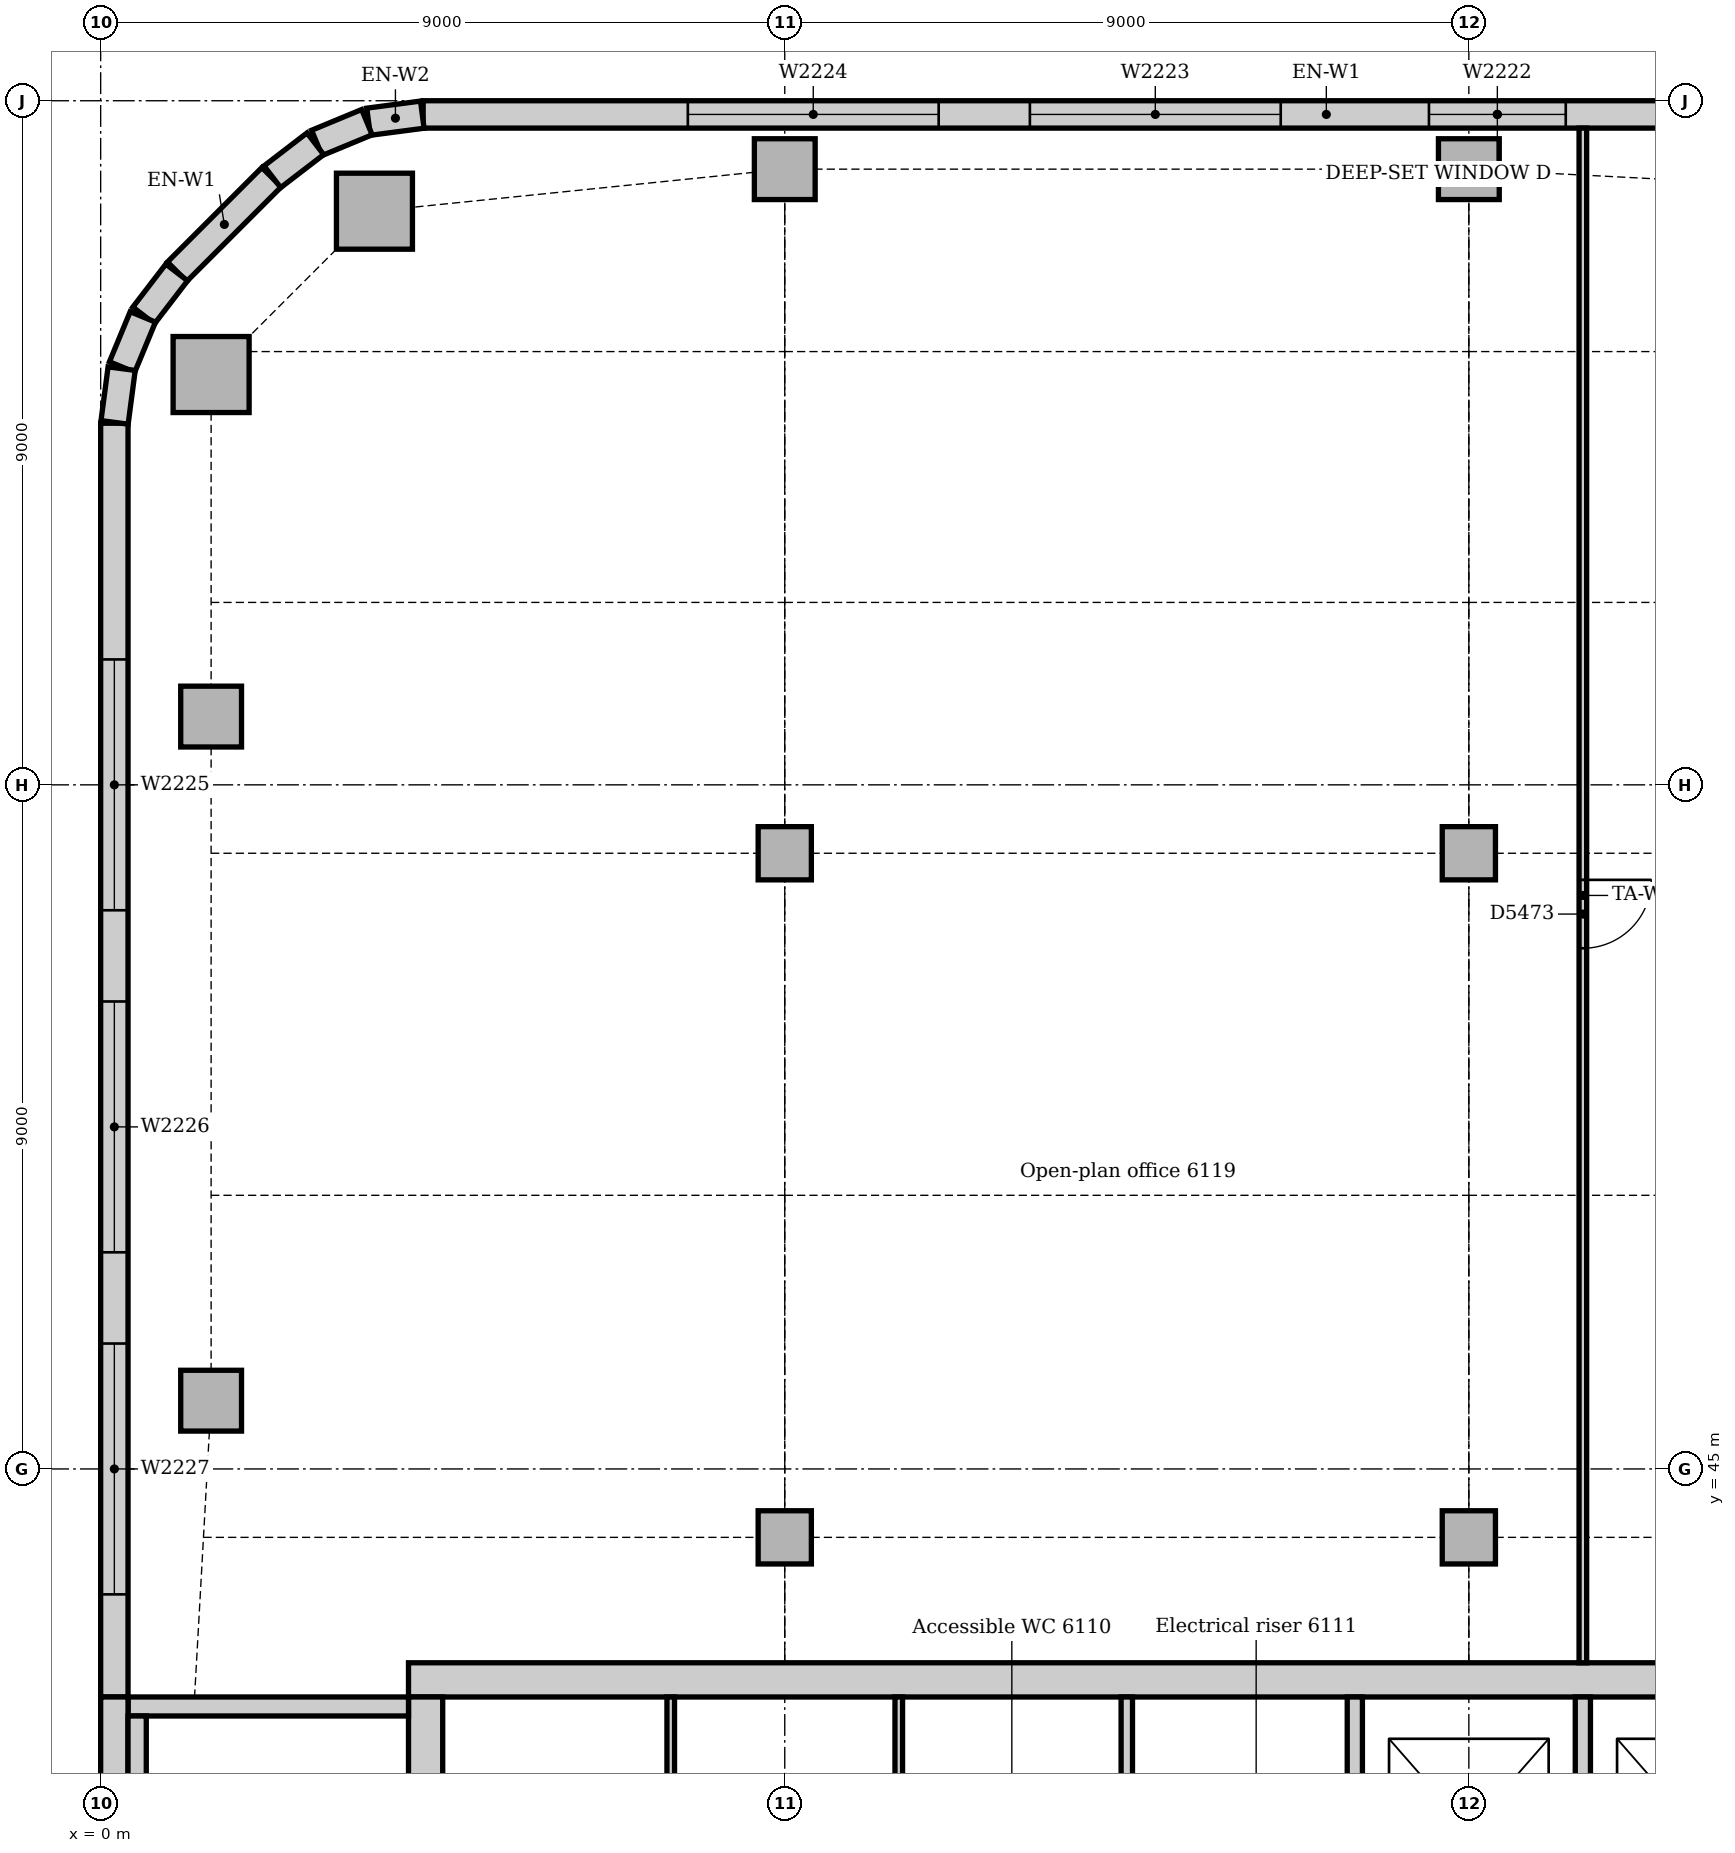
"""IFC4 building model, lengths in metres.
Left out: names, types, materials, properties, quantities, classifications, styles, units other than length and angle.
Written with IfcOpenShell. Run it as: python <this file> out.ifc"""

import sys

from ifc_helpers import new_model, si_unit, direction, frame, frame_2d, origin, origin_2d, place, context, subcontext, project, spatial, rectangle, extrude, element, fill, save


model = new_model("IFC4")
c1 = context("Model", 3, precision=1e-05, world=origin(), true_north=direction((0.0, 1.0)))
c2 = subcontext(c1, "Body", "Model", "MODEL_VIEW")
j1 = project(units=[si_unit("LENGTHUNIT", "METRE"), si_unit("PLANEANGLEUNIT", "RADIAN")], contexts=[c1])
p1 = place(None, origin())
s1 = spatial("IfcSite", under=j1, at=p1, CompositionType="ELEMENT")
p2 = place(p1, origin())
s2 = spatial("IfcBuilding", under=s1, at=p2, CompositionType="ELEMENT")
p3 = place(p2, frame((0.0, 0.0, 255.0)))
s3 = spatial("IfcBuildingStorey", under=s2, at=p3, CompositionType="ELEMENT", Elevation=255.0)
p4 = place(p3, frame((22.95, 42.225, 0.0), z_axis=(0.0, 0.0, 1.0), x_axis=(-1.0, 0.0, 0.0)))
e1 = element("IfcWall", 1, at=p4, inside=s3, PredefinedType="SOLIDWALL", context=c2, shape_type="SweptSolid", body=[
    extrude(rectangle(XDim=18.9, YDim=0.45, at=frame_2d((9.45, 0.0))), origin(), (0.0, 0.0, 1.0), 4.0),
])
p5 = place(p3, frame((4.275, 42.0, 0.0), z_axis=(0.0, 0.0, 1.0), x_axis=(0.0, -1.0, 0.0)))
e2 = element("IfcWall", 2, at=p5, inside=s3, PredefinedType="SOLIDWALL", context=c2, shape_type="SweptSolid", body=[
    extrude(rectangle(XDim=10.5, YDim=0.45, at=frame_2d((5.25, 0.0))), origin(), (0.0, 0.0, 1.0), 4.0),
])
p6 = place(p5, frame((5.3, 0.0, 0.0)))
e3 = element("IfcOpeningElement", 3, at=p6, cuts=e2, PredefinedType="OPENING", context=c2, shape_type="SweptSolid", body=[
    extrude(rectangle(XDim=1.0, YDim=2.1, at=frame_2d((0.5, 1.05))), frame((0.0, 0.235, 0.0), z_axis=(0.0, -1.0, 0.0), x_axis=(1.0, 0.0, 0.0)), (0.0, 0.0, 1.0), 0.47),
])
p7 = place(p3, frame((4.05, 41.875, 0.0), z_axis=(0.0, 0.0, 1.0), x_axis=(-1.0, 0.0, 0.0)))
e4 = element("IfcWall", 4, at=p7, inside=s3, PredefinedType="SOLIDWALL", context=c2, shape_type="SweptSolid", body=[
    extrude(rectangle(XDim=3.69, YDim=0.25, at=frame_2d((1.845, 0.0))), origin(), (0.0, 0.0, 1.0), 4.0),
])
for number, where, z_axis, x_axis in (
    (5, (3.602, 61.547, 0.0), (0.0, 0.0, 1.0), (1.0, 0.0, 0.0)),
    (6, (1.453, 59.398, 0.0), (0.0, 0.0, 1.0), (1.0, 0.0, 0.0)),
):
    element("IfcColumn", number, at=place(p3, frame(where, z_axis=z_axis, x_axis=x_axis)), inside=s3, PredefinedType="COLUMN", context=c2, shape_type="SweptSolid", body=[
        extrude(rectangle(XDim=1.0, YDim=1.0, at=origin_2d()), origin(), (0.0, 0.0, 1.0), 3.85),
    ])
for number, where, z_axis, x_axis in (
    (7, (9.0, 62.1, 0.0), (0.0, 0.0, 1.0), (1.0, 0.0, 0.0)),
    (8, (18.0, 62.1, 0.0), (0.0, 0.0, 1.0), (1.0, 0.0, 0.0)),
    (9, (1.453, 45.898, 0.0), (0.0, 0.0, 1.0), (1.0, 0.0, 0.0)),
    (10, (1.453, 54.898, 0.0), (0.0, 0.0, 1.0), (1.0, 0.0, 0.0)),
):
    element("IfcColumn", number, at=place(p3, frame(where, z_axis=z_axis, x_axis=x_axis)), inside=s3, PredefinedType="COLUMN", context=c2, shape_type="SweptSolid", body=[
        extrude(rectangle(XDim=0.8, YDim=0.8, at=origin_2d()), origin(), (0.0, 0.0, 1.0), 3.85),
    ])
for number, where, z_axis, x_axis in (
    (11, (9.0, 44.1, 0.0), (0.0, 0.0, 1.0), (1.0, 0.0, 0.0)),
    (12, (9.0, 53.1, 0.0), (0.0, 0.0, 1.0), (1.0, 0.0, 0.0)),
    (13, (18.0, 44.1, 0.0), (0.0, 0.0, 1.0), (1.0, 0.0, 0.0)),
    (14, (18.0, 53.1, 0.0), (0.0, 0.0, 1.0), (1.0, 0.0, 0.0)),
):
    element("IfcColumn", number, at=place(p3, frame(where, z_axis=z_axis, x_axis=x_axis)), inside=s3, PredefinedType="COLUMN", context=c2, shape_type="SweptSolid", body=[
        extrude(rectangle(XDim=0.7, YDim=0.7, at=origin_2d()), origin(), (0.0, 0.0, 1.0), 3.85),
    ])
p8 = place(p3, frame((28.007, 62.82, 0.0), z_axis=(0.0, 0.0, 1.0), x_axis=(-1.0, 0.0, 0.0)))
e15 = element("IfcWall", 15, at=p8, inside=s3, PredefinedType="STANDARD", context=c2, shape_type="SweptSolid", body=[
    extrude(rectangle(XDim=23.765, YDim=0.36, at=frame_2d((11.882, 0.0))), origin(), (0.0, 0.0, 1.0), 3.85),
])
p9 = place(p8, frame((3.482, 0.0, 0.9)))
e16 = element("IfcOpeningElement", 16, at=p9, cuts=e15, PredefinedType="OPENING", context=c2, shape_type="SweptSolid", body=[
    extrude(rectangle(XDim=3.3, YDim=1.6, at=frame_2d((1.65, 0.8))), frame((0.0, 0.19, 0.0), z_axis=(0.0, -1.0, 0.0), x_axis=(1.0, 0.0, 0.0)), (0.0, 0.0, 1.0), 0.38),
])
p10 = place(p8, frame((8.732, 0.0, 0.9)))
e17 = element("IfcOpeningElement", 17, at=p10, cuts=e15, PredefinedType="OPENING", context=c2, shape_type="SweptSolid", body=[
    extrude(rectangle(XDim=1.8, YDim=1.6, at=frame_2d((0.9, 0.8))), frame((0.0, 0.19, 0.0), z_axis=(0.0, -1.0, 0.0), x_axis=(1.0, 0.0, 0.0)), (0.0, 0.0, 1.0), 0.38),
])
p11 = place(p8, frame((12.482, 0.0, 0.9)))
e18 = element("IfcOpeningElement", 18, at=p11, cuts=e15, PredefinedType="OPENING", context=c2, shape_type="SweptSolid", body=[
    extrude(rectangle(XDim=3.3, YDim=1.6, at=frame_2d((1.65, 0.8))), frame((0.0, 0.19, 0.0), z_axis=(0.0, -1.0, 0.0), x_axis=(1.0, 0.0, 0.0)), (0.0, 0.0, 1.0), 0.38),
])
p12 = place(p8, frame((16.982, 0.0, 0.9)))
e19 = element("IfcOpeningElement", 19, at=p12, cuts=e15, PredefinedType="OPENING", context=c2, shape_type="SweptSolid", body=[
    extrude(rectangle(XDim=3.3, YDim=1.6, at=frame_2d((1.65, 0.8))), frame((0.0, 0.19, 0.0), z_axis=(0.0, -1.0, 0.0), x_axis=(1.0, 0.0, 0.0)), (0.0, 0.0, 1.0), 0.38),
])
p13 = place(p3, frame((2.249, 61.994, 0.0), z_axis=(0.0, 0.0, 1.0), x_axis=(-0.707106781187, -0.707106781187, 0.0)))
e20 = element("IfcWall", 20, at=p13, inside=s3, PredefinedType="STANDARD", context=c2, shape_type="SweptSolid", body=[
    extrude(rectangle(XDim=1.757, YDim=0.36, at=frame_2d((0.879, 0.0))), origin(), (0.0, 0.0, 1.0), 3.85),
])
p14 = place(p3, frame((0.18, 58.757, 0.0), z_axis=(0.0, 0.0, 1.0), x_axis=(0.0, -1.0, 0.0)))
e21 = element("IfcWall", 21, at=p14, inside=s3, PredefinedType="STANDARD", context=c2, shape_type="SweptSolid", body=[
    extrude(rectangle(XDim=16.757, YDim=0.36, at=frame_2d((8.379, 0.0))), origin(), (0.0, 0.0, 1.0), 3.85),
])
p15 = place(p14, frame((3.107, 0.0, 0.9)))
e22 = element("IfcOpeningElement", 22, at=p15, cuts=e21, PredefinedType="OPENING", context=c2, shape_type="SweptSolid", body=[
    extrude(rectangle(XDim=3.3, YDim=1.6, at=frame_2d((1.65, 0.8))), frame((0.0, 0.19, 0.0), z_axis=(0.0, -1.0, 0.0), x_axis=(1.0, 0.0, 0.0)), (0.0, 0.0, 1.0), 0.38),
])
p16 = place(p14, frame((7.607, 0.0, 0.9)))
e23 = element("IfcOpeningElement", 23, at=p16, cuts=e21, PredefinedType="OPENING", context=c2, shape_type="SweptSolid", body=[
    extrude(rectangle(XDim=3.3, YDim=1.6, at=frame_2d((1.65, 0.8))), frame((0.0, 0.19, 0.0), z_axis=(0.0, -1.0, 0.0), x_axis=(1.0, 0.0, 0.0)), (0.0, 0.0, 1.0), 0.38),
])
p17 = place(p14, frame((12.107, 0.0, 0.9)))
e24 = element("IfcOpeningElement", 24, at=p17, cuts=e21, PredefinedType="OPENING", context=c2, shape_type="SweptSolid", body=[
    extrude(rectangle(XDim=3.3, YDim=1.6, at=frame_2d((1.65, 0.8))), frame((0.0, 0.19, 0.0), z_axis=(0.0, -1.0, 0.0), x_axis=(1.0, 0.0, 0.0)), (0.0, 0.0, 1.0), 0.38),
])
p18 = place(p3, frame((0.18, 42.0, 0.0), z_axis=(0.0, 0.0, 1.0), x_axis=(0.0, -1.0, 0.0)))
e25 = element("IfcWall", 25, at=p18, inside=s3, PredefinedType="STANDARD", context=c2, shape_type="SweptSolid", body=[
    extrude(rectangle(XDim=6.75, YDim=0.36, at=frame_2d((3.375, 0.0))), origin(), (0.0, 0.0, 1.0), 3.85),
])
for number, where, z_axis, x_axis in (
    (26, (4.231, 62.817, 0.0), (0.0, 0.0, 1.0), (-0.991, -0.131, 0.0)),
    (27, (3.503, 62.718, 0.0), (0.0, 0.0, 1.0), (-0.924, -0.383, 0.0)),
):
    element("IfcWall", number, at=place(p3, frame(where, z_axis=z_axis, x_axis=x_axis)), inside=s3, PredefinedType="STANDARD", context=c2, shape_type="SweptSolid", body=[
        extrude(rectangle(XDim=0.713, YDim=0.36, at=frame_2d((0.356, 0.0))), origin(), (0.0, 0.0, 1.0), 3.85),
    ])
for number, where, z_axis, x_axis in (
    (28, (2.825, 62.434, 0.0), (0.0, 0.0, 1.0), (-0.793, -0.609, 0.0)),
    (29, (1.0, 60.741, 0.0), (0.0, 0.0, 1.0), (-0.609, -0.793, 0.0)),
):
    element("IfcWall", number, at=place(p3, frame(where, z_axis=z_axis, x_axis=x_axis)), inside=s3, PredefinedType="STANDARD", context=c2, shape_type="SweptSolid", body=[
        extrude(rectangle(XDim=0.713, YDim=0.36, at=frame_2d((0.357, 0.0))), origin(), (0.0, 0.0, 1.0), 3.85),
    ])
for number, where, z_axis, x_axis in (
    (30, (0.555, 60.156, 0.0), (0.0, 0.0, 1.0), (-0.383, -0.924, 0.0)),
    (31, (0.276, 59.476, 0.0), (0.0, 0.0, 1.0), (-0.131, -0.991, 0.0)),
):
    element("IfcWall", number, at=place(p3, frame(where, z_axis=z_axis, x_axis=x_axis)), inside=s3, PredefinedType="STANDARD", context=c2, shape_type="SweptSolid", body=[
        extrude(rectangle(XDim=0.713, YDim=0.36, at=frame_2d((0.356, 0.0))), origin(), (0.0, 0.0, 1.0), 3.85),
    ])
p19 = place(p3, frame((0.48, 40.13, 0.0), z_axis=(0.0, 0.0, 1.0), x_axis=(0.0, 1.0, 0.0)))
e32 = element("IfcWall", 32, at=p19, inside=s3, PredefinedType="STANDARD", context=c2, shape_type="SweptSolid", body=[
    extrude(rectangle(XDim=1.62, YDim=0.24, at=frame_2d((0.81, 0.0))), origin(), (0.0, 0.0, 1.0), 4.0),
])
for number, where, z_axis, x_axis in (
    (33, (16.5, 38.6, 0.0), (0.0, 0.0, 1.0), (0.0, 1.0, 0.0)),
    (34, (19.5, 38.6, 0.0), (0.0, 0.0, 1.0), (0.0, 1.0, 0.0)),
):
    element("IfcWall", number, at=place(p3, frame(where, z_axis=z_axis, x_axis=x_axis)), inside=s3, PredefinedType="PARTITIONING", context=c2, shape_type="SweptSolid", body=[
        extrude(rectangle(XDim=3.4, YDim=0.2, at=frame_2d((1.7, 0.0))), origin(), (0.0, 0.0, 1.0), 3.85),
    ])
p20 = place(p3, frame((13.5, 38.575, 0.0), z_axis=(0.0, 0.0, 1.0), x_axis=(0.0, 1.0, 0.0)))
e35 = element("IfcWall", 35, at=p20, inside=s3, PredefinedType="PARTITIONING", context=c2, shape_type="SweptSolid", body=[
    extrude(rectangle(XDim=3.425, YDim=0.15, at=frame_2d((1.712, 0.0))), origin(), (0.0, 0.0, 1.0), 3.85),
])
p21 = place(p3, frame((19.5, 42.45, 0.0), z_axis=(0.0, 0.0, 1.0), x_axis=(0.0, 1.0, 0.0)))
e36 = element("IfcWall", 36, at=p21, inside=s3, PredefinedType="PARTITIONING", context=c2, shape_type="SweptSolid", body=[
    extrude(rectangle(XDim=20.19, YDim=0.1, at=frame_2d((10.095, 0.0))), origin(), (0.0, 0.0, 1.0), 3.85),
])
p22 = place(p21, frame((9.4, 0.0, 0.0)))
e37 = element("IfcOpeningElement", 37, at=p22, cuts=e36, PredefinedType="OPENING", context=c2, shape_type="SweptSolid", body=[
    extrude(rectangle(XDim=0.9, YDim=2.1, at=frame_2d((0.45, 1.05))), frame((0.0, 0.06, 0.0), z_axis=(0.0, -1.0, 0.0), x_axis=(1.0, 0.0, 0.0)), (0.0, 0.0, 1.0), 0.12),
])
for number, where, z_axis, x_axis in (
    (38, (7.5, 38.575, 0.0), (0.0, 0.0, 1.0), (0.0, 1.0, 0.0)),
    (39, (10.5, 38.575, 0.0), (0.0, 0.0, 1.0), (0.0, 1.0, 0.0)),
):
    element("IfcWall", number, at=place(p3, frame(where, z_axis=z_axis, x_axis=x_axis)), inside=s3, PredefinedType="PARTITIONING", context=c2, shape_type="SweptSolid", body=[
        extrude(rectangle(XDim=3.425, YDim=0.1, at=frame_2d((1.712, 0.0))), origin(), (0.0, 0.0, 1.0), 3.85),
    ])
p23 = place(p10, origin())
e40 = element("IfcWindow", 40, at=p23, inside=s3, PartitioningType="SINGLE_PANEL", PredefinedType="WINDOW", context=c2, shape_type="SweptSolid", body=[
    extrude(rectangle(XDim=1.8, YDim=1.6, at=frame_2d((0.9, 0.8))), frame((0.0, 0.13, 0.0), z_axis=(0.0, -1.0, 0.0), x_axis=(1.0, 0.0, 0.0)), (0.0, 0.0, 1.0), 0.06),
])
fill(e17, e40)
p24 = place(p11, origin())
e41 = element("IfcWindow", 41, at=p24, inside=s3, PartitioningType="SINGLE_PANEL", PredefinedType="WINDOW", context=c2, shape_type="SweptSolid", body=[
    extrude(rectangle(XDim=3.3, YDim=1.6, at=frame_2d((1.65, 0.8))), frame((0.0, 0.13, 0.0), z_axis=(0.0, -1.0, 0.0), x_axis=(1.0, 0.0, 0.0)), (0.0, 0.0, 1.0), 0.06),
])
fill(e18, e41)
p25 = place(p12, origin())
e42 = element("IfcWindow", 42, at=p25, inside=s3, PartitioningType="SINGLE_PANEL", PredefinedType="WINDOW", context=c2, shape_type="SweptSolid", body=[
    extrude(rectangle(XDim=3.3, YDim=1.6, at=frame_2d((1.65, 0.8))), frame((0.0, 0.13, 0.0), z_axis=(0.0, -1.0, 0.0), x_axis=(1.0, 0.0, 0.0)), (0.0, 0.0, 1.0), 0.06),
])
fill(e19, e42)
p26 = place(p15, origin())
e43 = element("IfcWindow", 43, at=p26, inside=s3, PartitioningType="SINGLE_PANEL", PredefinedType="WINDOW", context=c2, shape_type="SweptSolid", body=[
    extrude(rectangle(XDim=3.3, YDim=1.6, at=frame_2d((1.65, 0.8))), frame((0.0, 0.13, 0.0), z_axis=(0.0, -1.0, 0.0), x_axis=(1.0, 0.0, 0.0)), (0.0, 0.0, 1.0), 0.06),
])
fill(e22, e43)
p27 = place(p16, origin())
e44 = element("IfcWindow", 44, at=p27, inside=s3, PartitioningType="SINGLE_PANEL", PredefinedType="WINDOW", context=c2, shape_type="SweptSolid", body=[
    extrude(rectangle(XDim=3.3, YDim=1.6, at=frame_2d((1.65, 0.8))), frame((0.0, 0.13, 0.0), z_axis=(0.0, -1.0, 0.0), x_axis=(1.0, 0.0, 0.0)), (0.0, 0.0, 1.0), 0.06),
])
fill(e23, e44)
p28 = place(p17, origin())
e45 = element("IfcWindow", 45, at=p28, inside=s3, PartitioningType="SINGLE_PANEL", PredefinedType="WINDOW", context=c2, shape_type="SweptSolid", body=[
    extrude(rectangle(XDim=3.3, YDim=1.6, at=frame_2d((1.65, 0.8))), frame((0.0, 0.13, 0.0), z_axis=(0.0, -1.0, 0.0), x_axis=(1.0, 0.0, 0.0)), (0.0, 0.0, 1.0), 0.06),
])
fill(e24, e45)
p29 = place(p22, frame((0.9, 0.0, 0.0), z_axis=(0.0, 0.0, 1.0), x_axis=(-1.0, 0.0, 0.0)))
e46 = element("IfcDoor", 46, at=p29, inside=s3, OperationType="SINGLE_SWING_LEFT", PredefinedType="DOOR", context=c2, shape_type="SweptSolid", body=[
    extrude(rectangle(XDim=0.9, YDim=2.1, at=frame_2d((0.45, 1.05))), frame((0.0, 0.025, 0.0), z_axis=(0.0, -1.0, 0.0), x_axis=(1.0, 0.0, 0.0)), (0.0, 0.0, 1.0), 0.05),
])
fill(e37, e46)
save(model, sys.argv[1])
